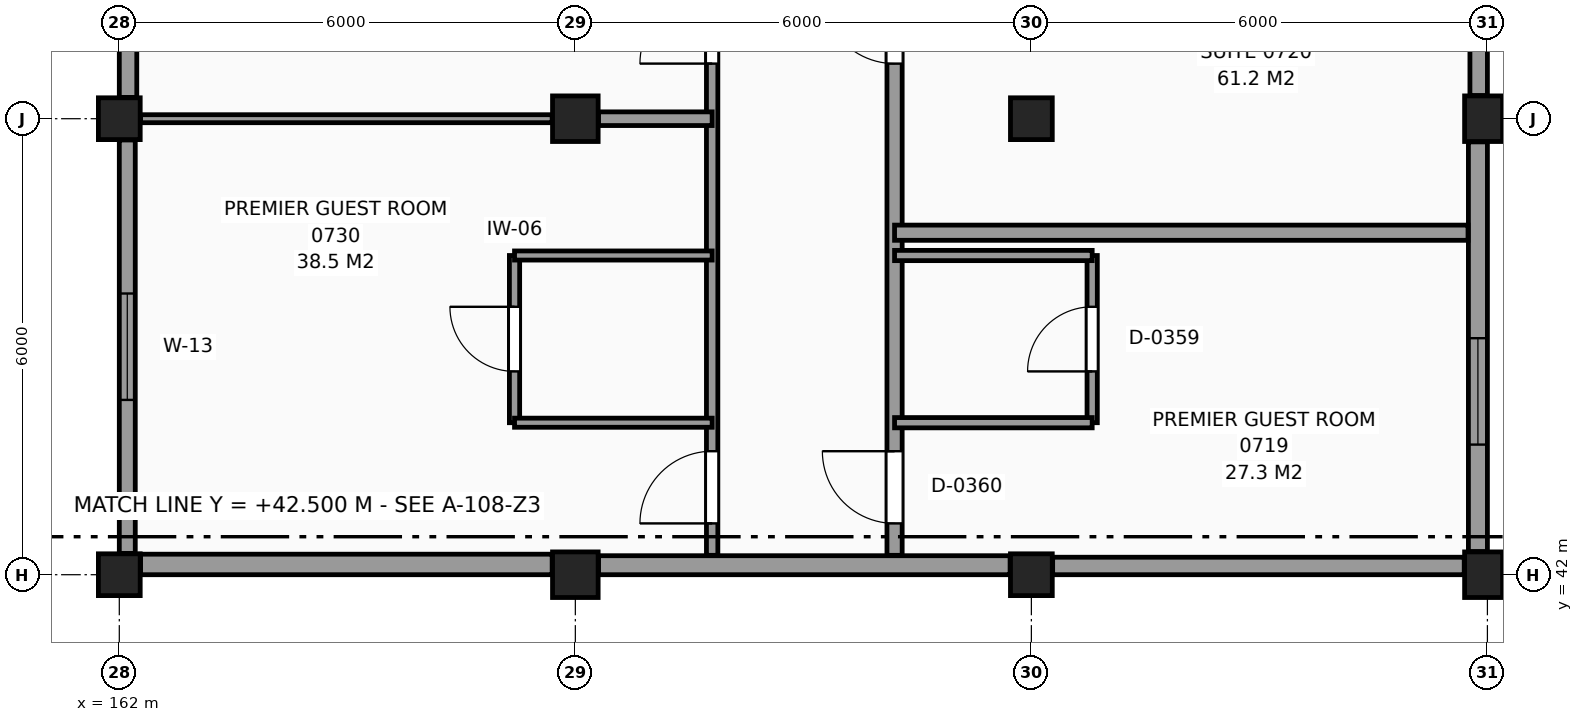
"""IFC4 building model, lengths in metres.
Left out: names, types, materials, properties, quantities, classifications, styles, units other than length and angle.
Written with IfcOpenShell. Run it as: python <this file> out.ifc"""

import sys

from ifc_helpers import new_model, si_unit, direction, frame, frame_2d, origin, origin_2d, place, context, subcontext, project, spatial, rectangle, extrude, element, fill, save


model = new_model("IFC4")
c1 = context("Model", 3, precision=1e-05, world=origin(), true_north=direction((0.0, 1.0)))
c2 = subcontext(c1, "Body", "Model", "MODEL_VIEW")
j1 = project(units=[si_unit("LENGTHUNIT", "METRE"), si_unit("PLANEANGLEUNIT", "RADIAN")], contexts=[c1])
p1 = place(None, origin())
s1 = spatial("IfcSite", under=j1, at=p1, CompositionType="ELEMENT")
p2 = place(p1, origin())
s2 = spatial("IfcBuilding", under=s1, at=p2, CompositionType="ELEMENT")
p3 = place(p2, frame((0.0, 0.0, 31.5)))
s3 = spatial("IfcBuildingStorey", under=s2, at=p3, CompositionType="ELEMENT", Elevation=31.5)
for number, where, z_axis, x_axis in (
    (1, (162.0, 42.0, 0.0), (0.0, 0.0, 1.0), (1.0, 0.0, 0.0)),
    (2, (162.0, 48.0, 0.0), (0.0, 0.0, 1.0), (1.0, 0.0, 0.0)),
):
    element("IfcColumn", number, at=place(p3, frame(where, z_axis=z_axis, x_axis=x_axis)), inside=s3, PredefinedType="COLUMN", context=c2, shape_type="SweptSolid", body=[
        extrude(rectangle(XDim=0.55, YDim=0.55, at=origin_2d()), origin(), (0.0, 0.0, 1.0), 3.3),
    ])
for number, where, z_axis, x_axis in (
    (3, (168.0, 42.0, 0.0), (0.0, 0.0, 1.0), (1.0, 0.0, 0.0)),
    (4, (168.0, 48.0, 0.0), (0.0, 0.0, 1.0), (1.0, 0.0, 0.0)),
):
    element("IfcColumn", number, at=place(p3, frame(where, z_axis=z_axis, x_axis=x_axis)), inside=s3, PredefinedType="COLUMN", context=c2, shape_type="SweptSolid", body=[
        extrude(rectangle(XDim=0.6, YDim=0.6, at=origin_2d()), origin(), (0.0, 0.0, 1.0), 3.3),
    ])
for number, where, z_axis, x_axis in (
    (5, (174.0, 42.0, 0.0), (0.0, 0.0, 1.0), (1.0, 0.0, 0.0)),
    (6, (174.0, 48.0, 0.0), (0.0, 0.0, 1.0), (1.0, 0.0, 0.0)),
):
    element("IfcColumn", number, at=place(p3, frame(where, z_axis=z_axis, x_axis=x_axis)), inside=s3, PredefinedType="COLUMN", context=c2, shape_type="SweptSolid", body=[
        extrude(rectangle(XDim=0.55, YDim=0.55, at=origin_2d()), origin(), (0.0, 0.0, 1.0), 3.3),
    ])
for number, where, z_axis, x_axis in (
    (7, (180.0, 42.0, 0.0), (0.0, 0.0, 1.0), (1.0, 0.0, 0.0)),
    (8, (180.0, 48.0, 0.0), (0.0, 0.0, 1.0), (1.0, 0.0, 0.0)),
):
    element("IfcColumn", number, at=place(p3, frame(where, z_axis=z_axis, x_axis=x_axis)), inside=s3, PredefinedType="COLUMN", context=c2, shape_type="SweptSolid", body=[
        extrude(rectangle(XDim=0.6, YDim=0.6, at=origin_2d()), origin(), (0.0, 0.0, 1.0), 3.3),
    ])
p4 = place(p3, frame((179.875, 42.305, 0.0), z_axis=(0.0, 0.0, 1.0), x_axis=(0.0, 1.0, 0.0)))
e9 = element("IfcWall", 9, at=p4, inside=s3, PredefinedType="SOLIDWALL", context=c2, shape_type="SweptSolid", body=[
    extrude(rectangle(XDim=5.39, YDim=0.25, at=frame_2d((2.695, 0.0))), origin(), (0.0, 0.0, 1.0), 2.42),
])
p5 = place(p4, frame((1.407, 0.0, 0.8)))
e10 = element("IfcOpeningElement", 10, at=p5, cuts=e9, PredefinedType="OPENING", context=c2, shape_type="SweptSolid", body=[
    extrude(rectangle(XDim=1.4, YDim=1.4, at=frame_2d((0.7, 0.7))), frame((0.0, 0.135, 0.0), z_axis=(0.0, -1.0, 0.0), x_axis=(1.0, 0.0, 0.0)), (0.0, 0.0, 1.0), 0.27),
])
p6 = place(p3, frame((179.885, 48.305, 0.0), z_axis=(0.0, 0.0, 1.0), x_axis=(0.0, 1.0, 0.0)))
e11 = element("IfcWall", 11, at=p6, inside=s3, PredefinedType="SOLIDWALL", context=c2, shape_type="SweptSolid", body=[
    extrude(rectangle(XDim=5.39, YDim=0.23, at=frame_2d((2.695, 0.0))), origin(), (0.0, 0.0, 1.0), 2.42),
])
p7 = place(p6, frame((1.995, 0.0, 0.8)))
e12 = element("IfcOpeningElement", 12, at=p7, cuts=e11, PredefinedType="OPENING", context=c2, shape_type="SweptSolid", body=[
    extrude(rectangle(XDim=1.4, YDim=1.4, at=frame_2d((0.7, 0.7))), frame((0.0, 0.125, 0.0), z_axis=(0.0, -1.0, 0.0), x_axis=(1.0, 0.0, 0.0)), (0.0, 0.0, 1.0), 0.25),
])
p8 = place(p3, frame((162.115, 53.72, 0.0), z_axis=(0.0, 0.0, 1.0), x_axis=(0.0, -1.0, 0.0)))
e13 = element("IfcWall", 13, at=p8, inside=s3, PredefinedType="SOLIDWALL", context=c2, shape_type="SweptSolid", body=[
    extrude(rectangle(XDim=5.44, YDim=0.23, at=frame_2d((2.72, 0.0))), origin(), (0.0, 0.0, 1.0), 2.42),
])
p9 = place(p8, frame((2.02, 0.0, 0.8)))
e14 = element("IfcOpeningElement", 14, at=p9, cuts=e13, PredefinedType="OPENING", context=c2, shape_type="SweptSolid", body=[
    extrude(rectangle(XDim=1.4, YDim=1.4, at=frame_2d((0.7, 0.7))), frame((0.0, 0.125, 0.0), z_axis=(0.0, -1.0, 0.0), x_axis=(1.0, 0.0, 0.0)), (0.0, 0.0, 1.0), 0.25),
])
p10 = place(p3, frame((162.105, 47.72, 0.0), z_axis=(0.0, 0.0, 1.0), x_axis=(0.0, -1.0, 0.0)))
e15 = element("IfcWall", 15, at=p10, inside=s3, PredefinedType="SOLIDWALL", context=c2, shape_type="SweptSolid", body=[
    extrude(rectangle(XDim=5.44, YDim=0.21, at=frame_2d((2.72, 0.0))), origin(), (0.0, 0.0, 1.0), 2.42),
])
p11 = place(p10, frame((2.02, 0.0, 0.8)))
e16 = element("IfcOpeningElement", 16, at=p11, cuts=e15, PredefinedType="OPENING", context=c2, shape_type="SweptSolid", body=[
    extrude(rectangle(XDim=1.4, YDim=1.4, at=frame_2d((0.7, 0.7))), frame((0.0, 0.115, 0.0), z_axis=(0.0, -1.0, 0.0), x_axis=(1.0, 0.0, 0.0)), (0.0, 0.0, 1.0), 0.23),
])
p12 = place(p3, frame((162.28, 42.135, 0.0), z_axis=(0.0, 0.0, 1.0), x_axis=(1.0, 0.0, 0.0)))
e17 = element("IfcWall", 17, at=p12, inside=s3, PredefinedType="SOLIDWALL", context=c2, shape_type="SweptSolid", body=[
    extrude(rectangle(XDim=5.415, YDim=0.27, at=frame_2d((2.708, 0.0))), origin(), (0.0, 0.0, 1.0), 2.27),
])
p13 = place(p3, frame((168.305, 42.125, 0.0), z_axis=(0.0, 0.0, 1.0), x_axis=(1.0, 0.0, 0.0)))
e18 = element("IfcWall", 18, at=p13, inside=s3, PredefinedType="SOLIDWALL", context=c2, shape_type="SweptSolid", body=[
    extrude(rectangle(XDim=5.415, YDim=0.25, at=frame_2d((2.708, 0.0))), origin(), (0.0, 0.0, 1.0), 2.27),
])
p14 = place(p3, frame((174.28, 42.115, 0.0), z_axis=(0.0, 0.0, 1.0), x_axis=(1.0, 0.0, 0.0)))
e19 = element("IfcWall", 19, at=p14, inside=s3, PredefinedType="SOLIDWALL", context=c2, shape_type="SweptSolid", body=[
    extrude(rectangle(XDim=5.415, YDim=0.23, at=frame_2d((2.708, 0.0))), origin(), (0.0, 0.0, 1.0), 2.27),
])
p15 = place(p3, frame((167.2, 44.0, 0.0), z_axis=(0.0, 0.0, 1.0), x_axis=(0.0, 1.0, 0.0)))
e20 = element("IfcWall", 20, at=p15, inside=s3, PredefinedType="PARTITIONING", context=c2, shape_type="SweptSolid", body=[
    extrude(rectangle(XDim=2.2, YDim=0.135, at=frame_2d((1.1, 0.0))), origin(), (0.0, 0.0, 1.0), 3.07),
])
p16 = place(p15, frame((0.675, 0.0, 0.0)))
e21 = element("IfcOpeningElement", 21, at=p16, cuts=e20, PredefinedType="OPENING", context=c2, shape_type="SweptSolid", body=[
    extrude(rectangle(XDim=0.85, YDim=2.1, at=frame_2d((0.425, 1.05))), frame((0.0, 0.078, 0.0), z_axis=(0.0, -1.0, 0.0), x_axis=(1.0, 0.0, 0.0)), (0.0, 0.0, 1.0), 0.155),
])
p17 = place(p3, frame((169.8, 42.255, 0.0), z_axis=(0.0, 0.0, 1.0), x_axis=(0.0, 1.0, 0.0)))
e22 = element("IfcWall", 22, at=p17, inside=s3, PredefinedType="PARTITIONING", context=c2, shape_type="SweptSolid", body=[
    extrude(rectangle(XDim=65.565, YDim=0.15, at=frame_2d((32.783, 0.0))), origin(), (0.0, 0.0, 1.0), 3.07),
])
p18 = place(p17, frame((50.145, 0.0, 0.0)))
e23 = element("IfcOpeningElement", 23, at=p18, cuts=e22, PredefinedType="OPENING", context=c2, shape_type="SweptSolid", body=[
    extrude(rectangle(XDim=1.2, YDim=2.2, at=frame_2d((0.6, 1.1))), frame((0.0, 0.085, 0.0), z_axis=(0.0, -1.0, 0.0), x_axis=(1.0, 0.0, 0.0)), (0.0, 0.0, 1.0), 0.17),
])
p19 = place(p17, frame((0.42, 0.0, 0.0)))
e24 = element("IfcOpeningElement", 24, at=p19, cuts=e22, PredefinedType="OPENING", context=c2, shape_type="SweptSolid", body=[
    extrude(rectangle(XDim=0.95, YDim=2.1, at=frame_2d((0.475, 1.05))), frame((0.0, 0.085, 0.0), z_axis=(0.0, -1.0, 0.0), x_axis=(1.0, 0.0, 0.0)), (0.0, 0.0, 1.0), 0.17),
])
p20 = place(p17, frame((6.47, 0.0, 0.0)))
e25 = element("IfcOpeningElement", 25, at=p20, cuts=e22, PredefinedType="OPENING", context=c2, shape_type="SweptSolid", body=[
    extrude(rectangle(XDim=0.95, YDim=2.1, at=frame_2d((0.475, 1.05))), frame((0.0, 0.085, 0.0), z_axis=(0.0, -1.0, 0.0), x_axis=(1.0, 0.0, 0.0)), (0.0, 0.0, 1.0), 0.17),
])
p21 = place(p17, frame((12.47, 0.0, 0.0)))
e26 = element("IfcOpeningElement", 26, at=p21, cuts=e22, PredefinedType="OPENING", context=c2, shape_type="SweptSolid", body=[
    extrude(rectangle(XDim=0.95, YDim=2.1, at=frame_2d((0.475, 1.05))), frame((0.0, 0.085, 0.0), z_axis=(0.0, -1.0, 0.0), x_axis=(1.0, 0.0, 0.0)), (0.0, 0.0, 1.0), 0.17),
])
p22 = place(p17, frame((18.47, 0.0, 0.0)))
e27 = element("IfcOpeningElement", 27, at=p22, cuts=e22, PredefinedType="OPENING", context=c2, shape_type="SweptSolid", body=[
    extrude(rectangle(XDim=0.95, YDim=2.1, at=frame_2d((0.475, 1.05))), frame((0.0, 0.085, 0.0), z_axis=(0.0, -1.0, 0.0), x_axis=(1.0, 0.0, 0.0)), (0.0, 0.0, 1.0), 0.17),
])
p23 = place(p17, frame((24.47, 0.0, 0.0)))
e28 = element("IfcOpeningElement", 28, at=p23, cuts=e22, PredefinedType="OPENING", context=c2, shape_type="SweptSolid", body=[
    extrude(rectangle(XDim=0.95, YDim=2.1, at=frame_2d((0.475, 1.05))), frame((0.0, 0.085, 0.0), z_axis=(0.0, -1.0, 0.0), x_axis=(1.0, 0.0, 0.0)), (0.0, 0.0, 1.0), 0.17),
])
p24 = place(p17, frame((30.47, 0.0, 0.0)))
e29 = element("IfcOpeningElement", 29, at=p24, cuts=e22, PredefinedType="OPENING", context=c2, shape_type="SweptSolid", body=[
    extrude(rectangle(XDim=0.95, YDim=2.1, at=frame_2d((0.475, 1.05))), frame((0.0, 0.085, 0.0), z_axis=(0.0, -1.0, 0.0), x_axis=(1.0, 0.0, 0.0)), (0.0, 0.0, 1.0), 0.17),
])
p25 = place(p17, frame((54.47, 0.0, 0.0)))
e30 = element("IfcOpeningElement", 30, at=p25, cuts=e22, PredefinedType="OPENING", context=c2, shape_type="SweptSolid", body=[
    extrude(rectangle(XDim=0.95, YDim=2.1, at=frame_2d((0.475, 1.05))), frame((0.0, 0.085, 0.0), z_axis=(0.0, -1.0, 0.0), x_axis=(1.0, 0.0, 0.0)), (0.0, 0.0, 1.0), 0.17),
])
p26 = place(p17, frame((60.47, 0.0, 0.0)))
e31 = element("IfcOpeningElement", 31, at=p26, cuts=e22, PredefinedType="OPENING", context=c2, shape_type="SweptSolid", body=[
    extrude(rectangle(XDim=0.95, YDim=2.1, at=frame_2d((0.475, 1.05))), frame((0.0, 0.085, 0.0), z_axis=(0.0, -1.0, 0.0), x_axis=(1.0, 0.0, 0.0)), (0.0, 0.0, 1.0), 0.17),
])
p27 = place(p3, frame((172.2, 42.255, 0.0), z_axis=(0.0, 0.0, 1.0), x_axis=(0.0, 1.0, 0.0)))
e32 = element("IfcWall", 32, at=p27, inside=s3, PredefinedType="PARTITIONING", context=c2, shape_type="SweptSolid", body=[
    extrude(rectangle(XDim=65.565, YDim=0.2, at=frame_2d((32.783, 0.0))), origin(), (0.0, 0.0, 1.0), 3.07),
])
p28 = place(p27, frame((0.42, 0.0, 0.0)))
e33 = element("IfcOpeningElement", 33, at=p28, cuts=e32, PredefinedType="OPENING", context=c2, shape_type="SweptSolid", body=[
    extrude(rectangle(XDim=0.95, YDim=2.1, at=frame_2d((0.475, 1.05))), frame((0.0, 0.11, 0.0), z_axis=(0.0, -1.0, 0.0), x_axis=(1.0, 0.0, 0.0)), (0.0, 0.0, 1.0), 0.22),
])
p29 = place(p27, frame((6.47, 0.0, 0.0)))
e34 = element("IfcOpeningElement", 34, at=p29, cuts=e32, PredefinedType="OPENING", context=c2, shape_type="SweptSolid", body=[
    extrude(rectangle(XDim=0.95, YDim=2.1, at=frame_2d((0.475, 1.05))), frame((0.0, 0.11, 0.0), z_axis=(0.0, -1.0, 0.0), x_axis=(1.0, 0.0, 0.0)), (0.0, 0.0, 1.0), 0.22),
])
p30 = place(p27, frame((16.27, 0.0, 0.0)))
e35 = element("IfcOpeningElement", 35, at=p30, cuts=e32, PredefinedType="OPENING", context=c2, shape_type="SweptSolid", body=[
    extrude(rectangle(XDim=0.95, YDim=2.1, at=frame_2d((0.475, 1.05))), frame((0.0, 0.11, 0.0), z_axis=(0.0, -1.0, 0.0), x_axis=(1.0, 0.0, 0.0)), (0.0, 0.0, 1.0), 0.22),
])
p31 = place(p27, frame((18.47, 0.0, 0.0)))
e36 = element("IfcOpeningElement", 36, at=p31, cuts=e32, PredefinedType="OPENING", context=c2, shape_type="SweptSolid", body=[
    extrude(rectangle(XDim=0.95, YDim=2.1, at=frame_2d((0.475, 1.05))), frame((0.0, 0.11, 0.0), z_axis=(0.0, -1.0, 0.0), x_axis=(1.0, 0.0, 0.0)), (0.0, 0.0, 1.0), 0.22),
])
p32 = place(p27, frame((22.87, 0.0, 0.0)))
e37 = element("IfcOpeningElement", 37, at=p32, cuts=e32, PredefinedType="OPENING", context=c2, shape_type="SweptSolid", body=[
    extrude(rectangle(XDim=0.95, YDim=2.1, at=frame_2d((0.475, 1.05))), frame((0.0, 0.11, 0.0), z_axis=(0.0, -1.0, 0.0), x_axis=(1.0, 0.0, 0.0)), (0.0, 0.0, 1.0), 0.22),
])
p33 = place(p27, frame((27.37, 0.0, 0.0)))
e38 = element("IfcOpeningElement", 38, at=p33, cuts=e32, PredefinedType="OPENING", context=c2, shape_type="SweptSolid", body=[
    extrude(rectangle(XDim=0.95, YDim=2.1, at=frame_2d((0.475, 1.05))), frame((0.0, 0.11, 0.0), z_axis=(0.0, -1.0, 0.0), x_axis=(1.0, 0.0, 0.0)), (0.0, 0.0, 1.0), 0.22),
])
p34 = place(p27, frame((36.47, 0.0, 0.0)))
e39 = element("IfcOpeningElement", 39, at=p34, cuts=e32, PredefinedType="OPENING", context=c2, shape_type="SweptSolid", body=[
    extrude(rectangle(XDim=0.95, YDim=2.1, at=frame_2d((0.475, 1.05))), frame((0.0, 0.11, 0.0), z_axis=(0.0, -1.0, 0.0), x_axis=(1.0, 0.0, 0.0)), (0.0, 0.0, 1.0), 0.22),
])
p35 = place(p27, frame((40.87, 0.0, 0.0)))
e40 = element("IfcOpeningElement", 40, at=p35, cuts=e32, PredefinedType="OPENING", context=c2, shape_type="SweptSolid", body=[
    extrude(rectangle(XDim=0.95, YDim=2.1, at=frame_2d((0.475, 1.05))), frame((0.0, 0.11, 0.0), z_axis=(0.0, -1.0, 0.0), x_axis=(1.0, 0.0, 0.0)), (0.0, 0.0, 1.0), 0.22),
])
p36 = place(p27, frame((48.07, 0.0, 0.0)))
e41 = element("IfcOpeningElement", 41, at=p36, cuts=e32, PredefinedType="OPENING", context=c2, shape_type="SweptSolid", body=[
    extrude(rectangle(XDim=0.95, YDim=2.1, at=frame_2d((0.475, 1.05))), frame((0.0, 0.11, 0.0), z_axis=(0.0, -1.0, 0.0), x_axis=(1.0, 0.0, 0.0)), (0.0, 0.0, 1.0), 0.22),
])
p37 = place(p27, frame((56.32, 0.0, 0.0)))
e42 = element("IfcOpeningElement", 42, at=p37, cuts=e32, PredefinedType="OPENING", context=c2, shape_type="SweptSolid", body=[
    extrude(rectangle(XDim=0.95, YDim=2.1, at=frame_2d((0.475, 1.05))), frame((0.0, 0.11, 0.0), z_axis=(0.0, -1.0, 0.0), x_axis=(1.0, 0.0, 0.0)), (0.0, 0.0, 1.0), 0.22),
])
p38 = place(p27, frame((60.47, 0.0, 0.0)))
e43 = element("IfcOpeningElement", 43, at=p38, cuts=e32, PredefinedType="OPENING", context=c2, shape_type="SweptSolid", body=[
    extrude(rectangle(XDim=0.95, YDim=2.1, at=frame_2d((0.475, 1.05))), frame((0.0, 0.11, 0.0), z_axis=(0.0, -1.0, 0.0), x_axis=(1.0, 0.0, 0.0)), (0.0, 0.0, 1.0), 0.22),
])
p39 = place(p3, frame((174.8, 44.0, 0.0), z_axis=(0.0, 0.0, 1.0), x_axis=(0.0, 1.0, 0.0)))
e44 = element("IfcWall", 44, at=p39, inside=s3, PredefinedType="PARTITIONING", context=c2, shape_type="SweptSolid", body=[
    extrude(rectangle(XDim=2.2, YDim=0.135, at=frame_2d((1.1, 0.0))), origin(), (0.0, 0.0, 1.0), 3.07),
])
p40 = place(p39, frame((0.675, 0.0, 0.0)))
e45 = element("IfcOpeningElement", 45, at=p40, cuts=e44, PredefinedType="OPENING", context=c2, shape_type="SweptSolid", body=[
    extrude(rectangle(XDim=0.85, YDim=2.1, at=frame_2d((0.425, 1.05))), frame((0.0, 0.078, 0.0), z_axis=(0.0, -1.0, 0.0), x_axis=(1.0, 0.0, 0.0)), (0.0, 0.0, 1.0), 0.155),
])
p41 = place(p3, frame((167.2, 44.0, 0.0), z_axis=(0.0, 0.0, 1.0), x_axis=(1.0, 0.0, 0.0)))
e46 = element("IfcWall", 46, at=p41, inside=s3, PredefinedType="PARTITIONING", context=c2, shape_type="SweptSolid", body=[
    extrude(rectangle(XDim=2.6, YDim=0.12, at=frame_2d((1.3, 0.0))), origin(), (0.0, 0.0, 1.0), 3.07),
])
p42 = place(p3, frame((172.2, 44.0, 0.0), z_axis=(0.0, 0.0, 1.0), x_axis=(1.0, 0.0, 0.0)))
e47 = element("IfcWall", 47, at=p42, inside=s3, PredefinedType="PARTITIONING", context=c2, shape_type="SweptSolid", body=[
    extrude(rectangle(XDim=2.6, YDim=0.135, at=frame_2d((1.3, 0.0))), origin(), (0.0, 0.0, 1.0), 3.07),
])
p43 = place(p3, frame((167.2, 46.2, 0.0), z_axis=(0.0, 0.0, 1.0), x_axis=(1.0, 0.0, 0.0)))
e48 = element("IfcWall", 48, at=p43, inside=s3, PredefinedType="PARTITIONING", context=c2, shape_type="SweptSolid", body=[
    extrude(rectangle(XDim=2.6, YDim=0.12, at=frame_2d((1.3, 0.0))), origin(), (0.0, 0.0, 1.0), 3.07),
])
p44 = place(p3, frame((172.2, 46.2, 0.0), z_axis=(0.0, 0.0, 1.0), x_axis=(1.0, 0.0, 0.0)))
e49 = element("IfcWall", 49, at=p44, inside=s3, PredefinedType="PARTITIONING", context=c2, shape_type="SweptSolid", body=[
    extrude(rectangle(XDim=2.6, YDim=0.135, at=frame_2d((1.3, 0.0))), origin(), (0.0, 0.0, 1.0), 3.07),
])
p45 = place(p3, frame((172.2, 46.5, 0.0), z_axis=(0.0, 0.0, 1.0), x_axis=(1.0, 0.0, 0.0)))
e50 = element("IfcWall", 50, at=p45, inside=s3, PredefinedType="PARTITIONING", context=c2, shape_type="SweptSolid", body=[
    extrude(rectangle(XDim=7.545, YDim=0.2, at=frame_2d((3.772, 0.0))), origin(), (0.0, 0.0, 1.0), 3.07),
])
p46 = place(p3, frame((162.28, 48.0, 0.0), z_axis=(0.0, 0.0, 1.0), x_axis=(1.0, 0.0, 0.0)))
e51 = element("IfcWall", 51, at=p46, inside=s3, PredefinedType="PARTITIONING", context=c2, shape_type="SweptSolid", body=[
    extrude(rectangle(XDim=5.415, YDim=0.105, at=frame_2d((2.708, 0.0))), origin(), (0.0, 0.0, 1.0), 2.27),
])
p47 = place(p3, frame((168.305, 48.0, 0.0), z_axis=(0.0, 0.0, 1.0), x_axis=(1.0, 0.0, 0.0)))
e52 = element("IfcWall", 52, at=p47, inside=s3, PredefinedType="PARTITIONING", context=c2, shape_type="SweptSolid", body=[
    extrude(rectangle(XDim=1.495, YDim=0.18, at=frame_2d((0.748, 0.0))), origin(), (0.0, 0.0, 1.0), 2.37),
])
p48 = place(p5, origin())
e53 = element("IfcWindow", 53, at=p48, inside=s3, PartitioningType="SINGLE_PANEL", PredefinedType="WINDOW", context=c2, shape_type="SweptSolid", body=[
    extrude(rectangle(XDim=1.4, YDim=1.4, at=frame_2d((0.7, 0.7))), frame((0.0, 0.03, 0.0), z_axis=(0.0, -1.0, 0.0), x_axis=(1.0, 0.0, 0.0)), (0.0, 0.0, 1.0), 0.06),
])
fill(e10, e53)
p49 = place(p11, origin())
e54 = element("IfcWindow", 54, at=p49, inside=s3, PartitioningType="SINGLE_PANEL", PredefinedType="WINDOW", context=c2, shape_type="SweptSolid", body=[
    extrude(rectangle(XDim=1.4, YDim=1.4, at=frame_2d((0.7, 0.7))), frame((0.0, 0.03, 0.0), z_axis=(0.0, -1.0, 0.0), x_axis=(1.0, 0.0, 0.0)), (0.0, 0.0, 1.0), 0.06),
])
fill(e16, e54)
p50 = place(p40, origin())
e55 = element("IfcDoor", 55, at=p50, inside=s3, OperationType="SINGLE_SWING_LEFT", PredefinedType="DOOR", context=c2, shape_type="SweptSolid", body=[
    extrude(rectangle(XDim=0.85, YDim=2.1, at=frame_2d((0.425, 1.05))), frame((0.0, 0.025, 0.0), z_axis=(0.0, -1.0, 0.0), x_axis=(1.0, 0.0, 0.0)), (0.0, 0.0, 1.0), 0.05),
])
fill(e45, e55)
p51 = place(p28, origin())
e56 = element("IfcDoor", 56, at=p51, inside=s3, OperationType="SINGLE_SWING_RIGHT", PredefinedType="DOOR", context=c2, shape_type="SweptSolid", body=[
    extrude(rectangle(XDim=0.95, YDim=2.1, at=frame_2d((0.475, 1.05))), frame((0.0, 0.025, 0.0), z_axis=(0.0, -1.0, 0.0), x_axis=(1.0, 0.0, 0.0)), (0.0, 0.0, 1.0), 0.05),
])
fill(e33, e56)
p52 = place(p29, origin())
e57 = element("IfcDoor", 57, at=p52, inside=s3, OperationType="SINGLE_SWING_RIGHT", PredefinedType="DOOR", context=c2, shape_type="SweptSolid", body=[
    extrude(rectangle(XDim=0.95, YDim=2.1, at=frame_2d((0.475, 1.05))), frame((0.0, 0.025, 0.0), z_axis=(0.0, -1.0, 0.0), x_axis=(1.0, 0.0, 0.0)), (0.0, 0.0, 1.0), 0.05),
])
fill(e34, e57)
p53 = place(p16, origin())
e58 = element("IfcDoor", 58, at=p53, inside=s3, OperationType="SINGLE_SWING_RIGHT", PredefinedType="DOOR", context=c2, shape_type="SweptSolid", body=[
    extrude(rectangle(XDim=0.85, YDim=2.1, at=frame_2d((0.425, 1.05))), frame((0.0, 0.025, 0.0), z_axis=(0.0, -1.0, 0.0), x_axis=(1.0, 0.0, 0.0)), (0.0, 0.0, 1.0), 0.05),
])
fill(e21, e58)
p54 = place(p19, origin())
e59 = element("IfcDoor", 59, at=p54, inside=s3, OperationType="SINGLE_SWING_LEFT", PredefinedType="DOOR", context=c2, shape_type="SweptSolid", body=[
    extrude(rectangle(XDim=0.95, YDim=2.1, at=frame_2d((0.475, 1.05))), frame((0.0, 0.025, 0.0), z_axis=(0.0, -1.0, 0.0), x_axis=(1.0, 0.0, 0.0)), (0.0, 0.0, 1.0), 0.05),
])
fill(e24, e59)
p55 = place(p20, origin())
e60 = element("IfcDoor", 60, at=p55, inside=s3, OperationType="SINGLE_SWING_LEFT", PredefinedType="DOOR", context=c2, shape_type="SweptSolid", body=[
    extrude(rectangle(XDim=0.95, YDim=2.1, at=frame_2d((0.475, 1.05))), frame((0.0, 0.025, 0.0), z_axis=(0.0, -1.0, 0.0), x_axis=(1.0, 0.0, 0.0)), (0.0, 0.0, 1.0), 0.05),
])
fill(e25, e60)
save(model, sys.argv[1])
